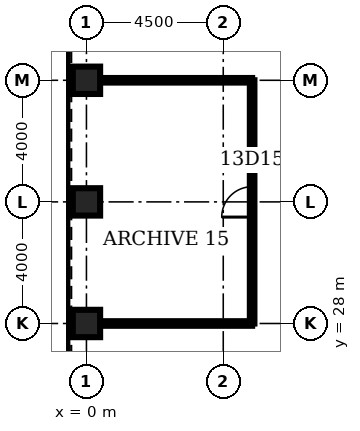
"""IFC4 building model, lengths in metres.
Left out: names, types, materials, properties, quantities, classifications, styles, units other than length and angle.
Written with IfcOpenShell. Run it as: python <this file> out.ifc"""

import sys

from ifc_helpers import new_model, si_unit, direction, frame, frame_2d, origin, origin_2d, place, context, subcontext, project, spatial, rectangle, hollow_rectangle, extrude, element, fill, save


model = new_model("IFC4")
c1 = context("Model", 3, precision=1e-05, world=origin(), true_north=direction((0.0, 1.0)))
c2 = subcontext(c1, "Body", "Model", "MODEL_VIEW")
j1 = project(units=[si_unit("LENGTHUNIT", "METRE"), si_unit("PLANEANGLEUNIT", "RADIAN")], contexts=[c1])
p1 = place(None, origin())
s1 = spatial("IfcSite", under=j1, at=p1, CompositionType="ELEMENT")
p2 = place(p1, origin())
s2 = spatial("IfcBuilding", under=s1, at=p2, CompositionType="ELEMENT")
p3 = place(p2, frame((0.0, 0.0, 63.5)))
s3 = spatial("IfcBuildingStorey", under=s2, at=p3, CompositionType="ELEMENT", Elevation=63.5)
for number, where, z_axis, x_axis in (
    (1, (0.0, 36.0, 0.0), (0.0, 0.0, 1.0), (1.0, 0.0, 0.0)),
    (2, (0.0, 32.0, 0.0), (0.0, 0.0, 1.0), (1.0, 0.0, 0.0)),
    (3, (0.0, 28.0, 0.0), (0.0, 0.0, 1.0), (1.0, 0.0, 0.0)),
):
    element("IfcColumn", number, at=place(p3, frame(where, z_axis=z_axis, x_axis=x_axis)), inside=s3, PredefinedType="COLUMN", context=c2, shape_type="SweptSolid", body=[
        extrude(hollow_rectangle(XDim=0.9, YDim=0.9, WallThickness=0.12, at=origin_2d()), origin(), (0.0, 0.0, 1.0), 4.5),
    ])
for number, where, z_axis, x_axis in (
    (4, (0.45, 28.0, 0.0), (0.0, 0.0, 1.0), (1.0, 0.0, 0.0)),
    (5, (0.45, 36.0, 0.0), (0.0, 0.0, 1.0), (1.0, 0.0, 0.0)),
):
    element("IfcWall", number, at=place(p3, frame(where, z_axis=z_axis, x_axis=x_axis)), inside=s3, PredefinedType="PARTITIONING", context=c2, shape_type="SweptSolid", body=[
        extrude(rectangle(XDim=5.0, YDim=0.15, at=frame_2d((2.5, 0.0))), origin(), (0.0, 0.0, 1.0), 3.0),
    ])
p4 = place(p3, frame((5.45, 28.0, 0.0), z_axis=(0.0, 0.0, 1.0), x_axis=(0.0, 1.0, 0.0)))
e6 = element("IfcWall", 6, at=p4, inside=s3, PredefinedType="PARTITIONING", context=c2, shape_type="SweptSolid", body=[
    extrude(rectangle(XDim=8.0, YDim=0.15, at=frame_2d((4.0, 0.0))), origin(), (0.0, 0.0, 1.0), 3.0),
])
p5 = place(p4, frame((3.5, 0.0, 0.0)))
e7 = element("IfcOpeningElement", 7, at=p5, cuts=e6, PredefinedType="OPENING", context=c2, shape_type="SweptSolid", body=[
    extrude(rectangle(XDim=1.0, YDim=2.1, at=frame_2d((0.5, 1.05))), frame((0.0, 0.085, 0.0), z_axis=(0.0, -1.0, 0.0), x_axis=(1.0, 0.0, 0.0)), (0.0, 0.0, 1.0), 0.17),
])
p6 = place(p5, origin())
e8 = element("IfcDoor", 8, at=p6, inside=s3, OperationType="SINGLE_SWING_LEFT", PredefinedType="DOOR", context=c2, shape_type="SweptSolid", body=[
    extrude(rectangle(XDim=1.0, YDim=2.1, at=frame_2d((0.5, 1.05))), frame((0.0, 0.025, 0.0), z_axis=(0.0, -1.0, 0.0), x_axis=(1.0, 0.0, 0.0)), (0.0, 0.0, 1.0), 0.05),
])
fill(e7, e8)
save(model, sys.argv[1])
